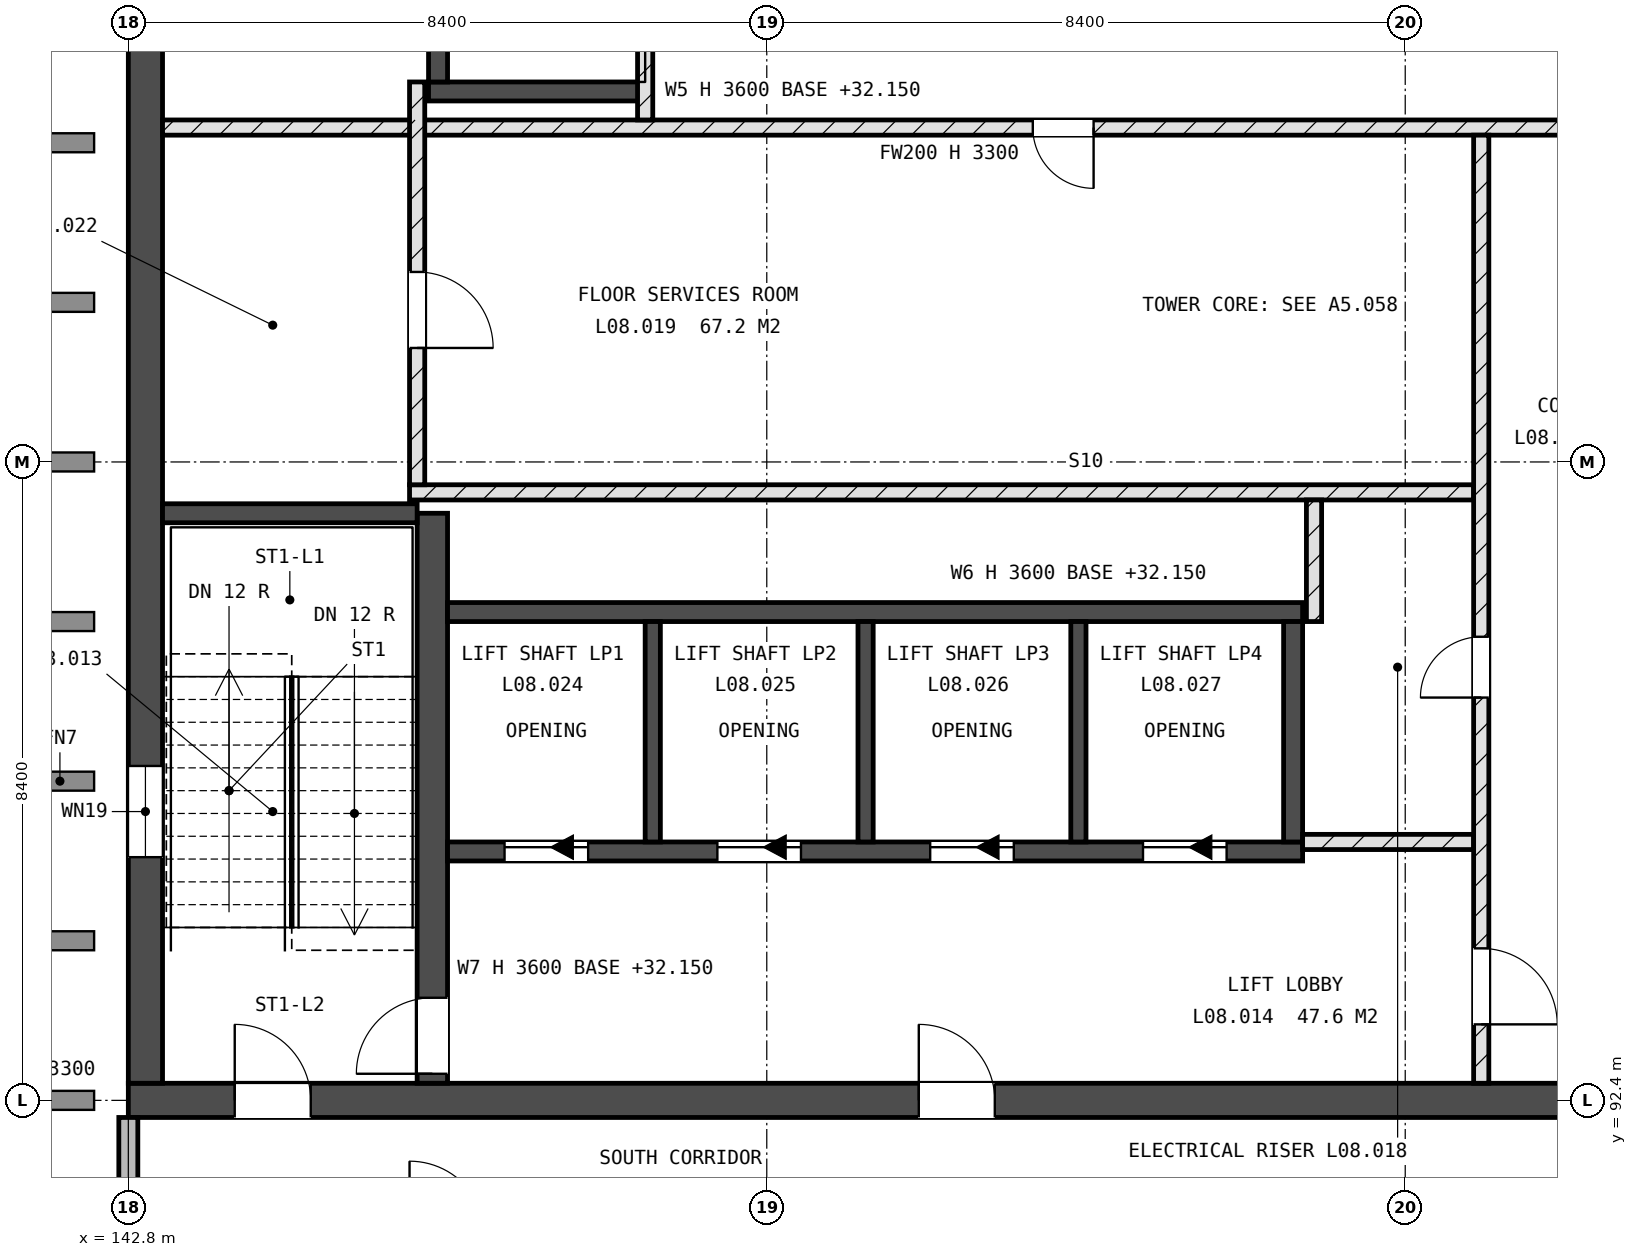
"""IFC4 building model, lengths in metres.
Left out: names, types, materials, properties, quantities, classifications, styles, units other than length and angle.
Written with IfcOpenShell. Run it as: python <this file> out.ifc"""

import sys

from ifc_helpers import new_model, si_unit, direction, frame, frame_2d, origin, place, context, subcontext, project, spatial, rectangle, extrude, element, fill, save


model = new_model("IFC4")
c1 = context("Model", 3, precision=1e-05, world=origin(), true_north=direction((0.0, 1.0)))
c2 = subcontext(c1, "Body", "Model", "MODEL_VIEW")
j1 = project(units=[si_unit("LENGTHUNIT", "METRE"), si_unit("PLANEANGLEUNIT", "RADIAN")], contexts=[c1])
p1 = place(None, origin())
s1 = spatial("IfcSite", under=j1, at=p1, CompositionType="ELEMENT")
p2 = place(p1, origin())
s2 = spatial("IfcBuilding", under=s1, at=p2, CompositionType="ELEMENT")
p3 = place(p2, frame((0.0, 0.0, 32.4)))
s3 = spatial("IfcBuildingStorey", under=s2, at=p3, CompositionType="ELEMENT", Elevation=32.4)
p4 = place(p3, frame((142.8, 92.4, -0.25), z_axis=(0.0, 0.0, 1.0), x_axis=(1.0, 0.0, 0.0)))
e1 = element("IfcWall", 1, at=p4, inside=s3, PredefinedType="SHEAR", context=c2, shape_type="SweptSolid", body=[
    extrude(rectangle(XDim=25.2, YDim=0.45, at=frame_2d((12.6, 0.0))), origin(), (0.0, 0.0, 1.0), 3.6),
])
p5 = place(p4, frame((1.4, 0.0, 0.25)))
e2 = element("IfcOpeningElement", 2, at=p5, cuts=e1, PredefinedType="OPENING", context=c2, shape_type="SweptSolid", body=[
    extrude(rectangle(XDim=1.0, YDim=2.1, at=frame_2d((0.5, 1.05))), frame((0.0, 0.235, 0.0), z_axis=(0.0, -1.0, 0.0), x_axis=(1.0, 0.0, 0.0)), (0.0, 0.0, 1.0), 0.47),
])
p6 = place(p4, frame((19.1, 0.0, 0.25)))
e3 = element("IfcOpeningElement", 3, at=p6, cuts=e1, PredefinedType="OPENING", context=c2, shape_type="SweptSolid", body=[
    extrude(rectangle(XDim=1.0, YDim=2.1, at=frame_2d((0.5, 1.05))), frame((0.0, 0.235, 0.0), z_axis=(0.0, -1.0, 0.0), x_axis=(1.0, 0.0, 0.0)), (0.0, 0.0, 1.0), 0.47),
])
p7 = place(p4, frame((10.4, 0.0, 0.25)))
e4 = element("IfcOpeningElement", 4, at=p7, cuts=e1, PredefinedType="OPENING", context=c2, shape_type="SweptSolid", body=[
    extrude(rectangle(XDim=1.0, YDim=2.1, at=frame_2d((0.5, 1.05))), frame((0.0, 0.235, 0.0), z_axis=(0.0, -1.0, 0.0), x_axis=(1.0, 0.0, 0.0)), (0.0, 0.0, 1.0), 0.47),
])
p8 = place(p3, frame((143.025, 92.625, -0.25), z_axis=(0.0, 0.0, 1.0), x_axis=(0.0, 1.0, 0.0)))
e5 = element("IfcWall", 5, at=p8, inside=s3, PredefinedType="SHEAR", context=c2, shape_type="SweptSolid", body=[
    extrude(rectangle(XDim=16.35, YDim=0.45, at=frame_2d((8.175, 0.0))), origin(), (0.0, 0.0, 1.0), 3.6),
])
p9 = place(p8, frame((2.975, 0.0, 1.85)))
e6 = element("IfcOpeningElement", 6, at=p9, cuts=e5, PredefinedType="OPENING", context=c2, shape_type="SweptSolid", body=[
    extrude(rectangle(XDim=1.2, YDim=0.9, at=frame_2d((0.6, 0.45))), frame((0.0, 0.235, 0.0), z_axis=(0.0, -1.0, 0.0), x_axis=(1.0, 0.0, 0.0)), (0.0, 0.0, 1.0), 0.47),
])
p10 = place(p3, frame((146.8, 92.625, -0.25), z_axis=(0.0, 0.0, 1.0), x_axis=(0.0, 1.0, 0.0)))
e7 = element("IfcWall", 7, at=p10, inside=s3, PredefinedType="SHEAR", context=c2, shape_type="SweptSolid", body=[
    extrude(rectangle(XDim=7.5, YDim=0.4, at=frame_2d((3.75, 0.0))), origin(), (0.0, 0.0, 1.0), 3.6),
])
p11 = place(p10, frame((0.125, 0.0, 0.25)))
e8 = element("IfcOpeningElement", 8, at=p11, cuts=e7, PredefinedType="OPENING", context=c2, shape_type="SweptSolid", body=[
    extrude(rectangle(XDim=1.0, YDim=2.1, at=frame_2d((0.5, 1.05))), frame((0.0, 0.21, 0.0), z_axis=(0.0, -1.0, 0.0), x_axis=(1.0, 0.0, 0.0)), (0.0, 0.0, 1.0), 0.42),
])
p12 = place(p3, frame((143.25, 100.125, -0.25), z_axis=(0.0, 0.0, 1.0), x_axis=(1.0, 0.0, 0.0)))
e9 = element("IfcWall", 9, at=p12, inside=s3, PredefinedType="SHEAR", context=c2, shape_type="SweptSolid", body=[
    extrude(rectangle(XDim=3.35, YDim=0.25, at=frame_2d((1.675, 0.0))), origin(), (0.0, 0.0, 1.0), 3.6),
])
p13 = place(p3, frame((147.0, 95.675, -0.25), z_axis=(0.0, 0.0, 1.0), x_axis=(1.0, 0.0, 0.0)))
e10 = element("IfcWall", 10, at=p13, inside=s3, PredefinedType="SHEAR", context=c2, shape_type="SweptSolid", body=[
    extrude(rectangle(XDim=11.25, YDim=0.25, at=frame_2d((5.625, 0.0))), origin(), (0.0, 0.0, 1.0), 3.6),
])
p14 = place(p13, frame((0.75, 0.0, 0.25)))
e11 = element("IfcOpeningElement", 11, at=p14, cuts=e10, PredefinedType="OPENING", context=c2, shape_type="SweptSolid", body=[
    extrude(rectangle(XDim=1.1, YDim=2.1, at=frame_2d((0.55, 1.05))), frame((0.0, 0.135, 0.0), z_axis=(0.0, -1.0, 0.0), x_axis=(1.0, 0.0, 0.0)), (0.0, 0.0, 1.0), 0.27),
])
p15 = place(p13, frame((3.55, 0.0, 0.25)))
e12 = element("IfcOpeningElement", 12, at=p15, cuts=e10, PredefinedType="OPENING", context=c2, shape_type="SweptSolid", body=[
    extrude(rectangle(XDim=1.1, YDim=2.1, at=frame_2d((0.55, 1.05))), frame((0.0, 0.135, 0.0), z_axis=(0.0, -1.0, 0.0), x_axis=(1.0, 0.0, 0.0)), (0.0, 0.0, 1.0), 0.27),
])
p16 = place(p13, frame((6.35, 0.0, 0.25)))
e13 = element("IfcOpeningElement", 13, at=p16, cuts=e10, PredefinedType="OPENING", context=c2, shape_type="SweptSolid", body=[
    extrude(rectangle(XDim=1.1, YDim=2.1, at=frame_2d((0.55, 1.05))), frame((0.0, 0.135, 0.0), z_axis=(0.0, -1.0, 0.0), x_axis=(1.0, 0.0, 0.0)), (0.0, 0.0, 1.0), 0.27),
])
p17 = place(p13, frame((9.15, 0.0, 0.25)))
e14 = element("IfcOpeningElement", 14, at=p17, cuts=e10, PredefinedType="OPENING", context=c2, shape_type="SweptSolid", body=[
    extrude(rectangle(XDim=1.1, YDim=2.1, at=frame_2d((0.55, 1.05))), frame((0.0, 0.135, 0.0), z_axis=(0.0, -1.0, 0.0), x_axis=(1.0, 0.0, 0.0)), (0.0, 0.0, 1.0), 0.27),
])
p18 = place(p3, frame((147.0, 98.825, -0.25), z_axis=(0.0, 0.0, 1.0), x_axis=(1.0, 0.0, 0.0)))
e15 = element("IfcWall", 15, at=p18, inside=s3, PredefinedType="SHEAR", context=c2, shape_type="SweptSolid", body=[
    extrude(rectangle(XDim=11.25, YDim=0.25, at=frame_2d((5.625, 0.0))), origin(), (0.0, 0.0, 1.0), 3.6),
])
p19 = place(p3, frame((158.125, 95.8, -0.25), z_axis=(0.0, 0.0, 1.0), x_axis=(0.0, 1.0, 0.0)))
e16 = element("IfcWall", 16, at=p19, inside=s3, PredefinedType="SHEAR", context=c2, shape_type="SweptSolid", body=[
    extrude(rectangle(XDim=2.9, YDim=0.25, at=frame_2d((1.45, 0.0))), origin(), (0.0, 0.0, 1.0), 3.6),
])
for number, where, z_axis, x_axis in (
    (17, (149.7, 95.8, -0.25), (0.0, 0.0, 1.0), (0.0, 1.0, 0.0)),
    (18, (152.5, 95.8, -0.25), (0.0, 0.0, 1.0), (0.0, 1.0, 0.0)),
    (19, (155.3, 95.8, -0.25), (0.0, 0.0, 1.0), (0.0, 1.0, 0.0)),
):
    element("IfcWall", number, at=place(p3, frame(where, z_axis=z_axis, x_axis=x_axis)), inside=s3, PredefinedType="SHEAR", context=c2, shape_type="SweptSolid", body=[
        extrude(rectangle(XDim=2.9, YDim=0.2, at=frame_2d((1.45, 0.0))), origin(), (0.0, 0.0, 1.0), 3.6),
    ])
p20 = place(p3, frame((146.75, 105.675, -0.25), z_axis=(0.0, 0.0, 1.0), x_axis=(1.0, 0.0, 0.0)))
e20 = element("IfcWall", 20, at=p20, inside=s3, PredefinedType="SHEAR", context=c2, shape_type="SweptSolid", body=[
    extrude(rectangle(XDim=2.85, YDim=0.25, at=frame_2d((1.425, 0.0))), origin(), (0.0, 0.0, 1.0), 3.6),
])
p21 = place(p3, frame((146.875, 105.8, -0.25), z_axis=(0.0, 0.0, 1.0), x_axis=(0.0, 1.0, 0.0)))
e21 = element("IfcWall", 21, at=p21, inside=s3, PredefinedType="SHEAR", context=c2, shape_type="SweptSolid", body=[
    extrude(rectangle(XDim=2.9, YDim=0.25, at=frame_2d((1.45, 0.0))), origin(), (0.0, 0.0, 1.0), 3.6),
])
p22 = place(p3, frame((142.8, 84.45, 0.0), z_axis=(0.0, 0.0, 1.0), x_axis=(0.0, 1.0, 0.0)))
e22 = element("IfcWall", 22, at=p22, inside=s3, PredefinedType="STANDARD", context=c2, shape_type="SweptSolid", body=[
    extrude(rectangle(XDim=7.725, YDim=0.25, at=frame_2d((3.863, 0.0))), origin(), (0.0, 0.0, 1.0), 3.3),
])
p23 = place(p22, frame((2.25, 0.0, 2.1)))
e23 = element("IfcOpeningElement", 23, at=p23, cuts=e22, PredefinedType="OPENING", context=c2, shape_type="SweptSolid", body=[
    extrude(rectangle(XDim=0.9, YDim=0.6, at=frame_2d((0.45, 0.3))), frame((0.0, 0.135, 0.0), z_axis=(0.0, -1.0, 0.0), x_axis=(1.0, 0.0, 0.0)), (0.0, 0.0, 1.0), 0.27),
])
p24 = place(p3, frame((158.25, 95.8, 0.0), z_axis=(0.0, 0.0, 1.0), x_axis=(1.0, 0.0, 0.0)))
e24 = element("IfcWall", 24, at=p24, inside=s3, PredefinedType="SOLIDWALL", context=c2, shape_type="SweptSolid", body=[
    extrude(rectangle(XDim=2.25, YDim=0.2, at=frame_2d((1.125, 0.0))), origin(), (0.0, 0.0, 1.0), 3.3),
])
p25 = place(p3, frame((146.5, 100.4, 0.0), z_axis=(0.0, 0.0, 1.0), x_axis=(1.0, 0.0, 0.0)))
e25 = element("IfcWall", 25, at=p25, inside=s3, PredefinedType="SOLIDWALL", context=c2, shape_type="SweptSolid", body=[
    extrude(rectangle(XDim=14.0, YDim=0.2, at=frame_2d((7.0, 0.0))), origin(), (0.0, 0.0, 1.0), 3.3),
])
p26 = place(p3, frame((143.25, 105.2, 0.0), z_axis=(0.0, 0.0, 1.0), x_axis=(1.0, 0.0, 0.0)))
e26 = element("IfcWall", 26, at=p26, inside=s3, PredefinedType="SOLIDWALL", context=c2, shape_type="SweptSolid", body=[
    extrude(rectangle(XDim=20.7, YDim=0.2, at=frame_2d((10.35, 0.0))), origin(), (0.0, 0.0, 1.0), 3.3),
])
p27 = place(p26, frame((11.45, 0.0, 0.0)))
e27 = element("IfcOpeningElement", 27, at=p27, cuts=e26, PredefinedType="OPENING", context=c2, shape_type="SweptSolid", body=[
    extrude(rectangle(XDim=0.8, YDim=2.1, at=frame_2d((0.4, 1.05))), frame((0.0, 0.11, 0.0), z_axis=(0.0, -1.0, 0.0), x_axis=(1.0, 0.0, 0.0)), (0.0, 0.0, 1.0), 0.22),
])
p28 = place(p26, frame((18.75, 0.0, 0.0)))
e28 = element("IfcOpeningElement", 28, at=p28, cuts=e26, PredefinedType="OPENING", context=c2, shape_type="SweptSolid", body=[
    extrude(rectangle(XDim=1.0, YDim=2.1, at=frame_2d((0.5, 1.05))), frame((0.0, 0.11, 0.0), z_axis=(0.0, -1.0, 0.0), x_axis=(1.0, 0.0, 0.0)), (0.0, 0.0, 1.0), 0.22),
])
p29 = place(p3, frame((146.6, 100.5, 0.0), z_axis=(0.0, 0.0, 1.0), x_axis=(0.0, 1.0, 0.0)))
e29 = element("IfcWall", 29, at=p29, inside=s3, PredefinedType="SOLIDWALL", context=c2, shape_type="SweptSolid", body=[
    extrude(rectangle(XDim=5.3, YDim=0.2, at=frame_2d((2.65, 0.0))), origin(), (0.0, 0.0, 1.0), 3.3),
])
p30 = place(p29, frame((1.8, 0.0, 0.0)))
e30 = element("IfcOpeningElement", 30, at=p30, cuts=e29, PredefinedType="OPENING", context=c2, shape_type="SweptSolid", body=[
    extrude(rectangle(XDim=1.0, YDim=2.1, at=frame_2d((0.5, 1.05))), frame((0.0, 0.11, 0.0), z_axis=(0.0, -1.0, 0.0), x_axis=(1.0, 0.0, 0.0)), (0.0, 0.0, 1.0), 0.22),
])
p31 = place(p3, frame((149.6, 105.3, 0.0), z_axis=(0.0, 0.0, 1.0), x_axis=(0.0, 1.0, 0.0)))
e31 = element("IfcWall", 31, at=p31, inside=s3, PredefinedType="SOLIDWALL", context=c2, shape_type="SweptSolid", body=[
    extrude(rectangle(XDim=3.675, YDim=0.2, at=frame_2d((1.837, 0.0))), origin(), (0.0, 0.0, 1.0), 3.3),
])
p32 = place(p31, frame((1.4, 0.0, 0.0)))
e32 = element("IfcOpeningElement", 32, at=p32, cuts=e31, PredefinedType="OPENING", context=c2, shape_type="SweptSolid", body=[
    extrude(rectangle(XDim=1.1, YDim=2.1, at=frame_2d((0.55, 1.05))), frame((0.0, 0.11, 0.0), z_axis=(0.0, -1.0, 0.0), x_axis=(1.0, 0.0, 0.0)), (0.0, 0.0, 1.0), 0.22),
])
p33 = place(p3, frame((158.4, 98.7, 0.0), z_axis=(0.0, 0.0, 1.0), x_axis=(0.0, 1.0, 0.0)))
e33 = element("IfcWall", 33, at=p33, inside=s3, PredefinedType="SOLIDWALL", context=c2, shape_type="SweptSolid", body=[
    extrude(rectangle(XDim=1.6, YDim=0.2, at=frame_2d((0.8, 0.0))), origin(), (0.0, 0.0, 1.0), 3.3),
])
p34 = place(p3, frame((160.6, 92.625, 0.0), z_axis=(0.0, 0.0, 1.0), x_axis=(0.0, 1.0, 0.0)))
e34 = element("IfcWall", 34, at=p34, inside=s3, PredefinedType="SOLIDWALL", context=c2, shape_type="SweptSolid", body=[
    extrude(rectangle(XDim=12.475, YDim=0.2, at=frame_2d((6.238, 0.0))), origin(), (0.0, 0.0, 1.0), 3.3),
])
p35 = place(p34, frame((5.075, 0.0, 0.0)))
e35 = element("IfcOpeningElement", 35, at=p35, cuts=e34, PredefinedType="OPENING", context=c2, shape_type="SweptSolid", body=[
    extrude(rectangle(XDim=0.8, YDim=2.1, at=frame_2d((0.4, 1.05))), frame((0.0, 0.11, 0.0), z_axis=(0.0, -1.0, 0.0), x_axis=(1.0, 0.0, 0.0)), (0.0, 0.0, 1.0), 0.22),
])
p36 = place(p34, frame((0.775, 0.0, 0.0)))
e36 = element("IfcOpeningElement", 36, at=p36, cuts=e34, PredefinedType="OPENING", context=c2, shape_type="SweptSolid", body=[
    extrude(rectangle(XDim=1.0, YDim=2.1, at=frame_2d((0.5, 1.05))), frame((0.0, 0.11, 0.0), z_axis=(0.0, -1.0, 0.0), x_axis=(1.0, 0.0, 0.0)), (0.0, 0.0, 1.0), 0.22),
])
p37 = place(p9, origin())
e37 = element("IfcWindow", 37, at=p37, inside=s3, PartitioningType="SINGLE_PANEL", PredefinedType="WINDOW", context=c2, shape_type="SweptSolid", body=[
    extrude(rectangle(XDim=1.2, YDim=0.9, at=frame_2d((0.6, 0.45))), frame((0.0, 0.03, 0.0), z_axis=(0.0, -1.0, 0.0), x_axis=(1.0, 0.0, 0.0)), (0.0, 0.0, 1.0), 0.06),
])
fill(e6, e37)
p38 = place(p14, origin())
e38 = element("IfcDoor", 38, at=p38, inside=s3, OperationType="SLIDING_TO_LEFT", PredefinedType="DOOR", context=c2, shape_type="SweptSolid", body=[
    extrude(rectangle(XDim=1.1, YDim=2.1, at=frame_2d((0.55, 1.05))), frame((0.0, 0.025, 0.0), z_axis=(0.0, -1.0, 0.0), x_axis=(1.0, 0.0, 0.0)), (0.0, 0.0, 1.0), 0.05),
])
fill(e11, e38)
p39 = place(p15, origin())
e39 = element("IfcDoor", 39, at=p39, inside=s3, OperationType="SLIDING_TO_LEFT", PredefinedType="DOOR", context=c2, shape_type="SweptSolid", body=[
    extrude(rectangle(XDim=1.1, YDim=2.1, at=frame_2d((0.55, 1.05))), frame((0.0, 0.025, 0.0), z_axis=(0.0, -1.0, 0.0), x_axis=(1.0, 0.0, 0.0)), (0.0, 0.0, 1.0), 0.05),
])
fill(e12, e39)
p40 = place(p16, origin())
e40 = element("IfcDoor", 40, at=p40, inside=s3, OperationType="SLIDING_TO_LEFT", PredefinedType="DOOR", context=c2, shape_type="SweptSolid", body=[
    extrude(rectangle(XDim=1.1, YDim=2.1, at=frame_2d((0.55, 1.05))), frame((0.0, 0.025, 0.0), z_axis=(0.0, -1.0, 0.0), x_axis=(1.0, 0.0, 0.0)), (0.0, 0.0, 1.0), 0.05),
])
fill(e13, e40)
p41 = place(p17, origin())
e41 = element("IfcDoor", 41, at=p41, inside=s3, OperationType="SLIDING_TO_LEFT", PredefinedType="DOOR", context=c2, shape_type="SweptSolid", body=[
    extrude(rectangle(XDim=1.1, YDim=2.1, at=frame_2d((0.55, 1.05))), frame((0.0, 0.025, 0.0), z_axis=(0.0, -1.0, 0.0), x_axis=(1.0, 0.0, 0.0)), (0.0, 0.0, 1.0), 0.05),
])
fill(e14, e41)
p42 = place(p5, origin())
e42 = element("IfcDoor", 42, at=p42, inside=s3, OperationType="SINGLE_SWING_RIGHT", PredefinedType="DOOR", context=c2, shape_type="SweptSolid", body=[
    extrude(rectangle(XDim=1.0, YDim=2.1, at=frame_2d((0.5, 1.05))), frame((0.0, 0.025, 0.0), z_axis=(0.0, -1.0, 0.0), x_axis=(1.0, 0.0, 0.0)), (0.0, 0.0, 1.0), 0.05),
])
fill(e2, e42)
p43 = place(p11, origin())
e43 = element("IfcDoor", 43, at=p43, inside=s3, OperationType="SINGLE_SWING_RIGHT", PredefinedType="DOOR", context=c2, shape_type="SweptSolid", body=[
    extrude(rectangle(XDim=1.0, YDim=2.1, at=frame_2d((0.5, 1.05))), frame((0.0, 0.025, 0.0), z_axis=(0.0, -1.0, 0.0), x_axis=(1.0, 0.0, 0.0)), (0.0, 0.0, 1.0), 0.05),
])
fill(e8, e43)
p44 = place(p35, origin())
e44 = element("IfcDoor", 44, at=p44, inside=s3, OperationType="SINGLE_SWING_RIGHT", PredefinedType="DOOR", context=c2, shape_type="SweptSolid", body=[
    extrude(rectangle(XDim=0.8, YDim=2.1, at=frame_2d((0.4, 1.05))), frame((0.0, 0.025, 0.0), z_axis=(0.0, -1.0, 0.0), x_axis=(1.0, 0.0, 0.0)), (0.0, 0.0, 1.0), 0.05),
])
fill(e35, e44)
p45 = place(p27, origin())
e45 = element("IfcDoor", 45, at=p45, inside=s3, OperationType="SINGLE_SWING_RIGHT", PredefinedType="DOOR", context=c2, shape_type="SweptSolid", body=[
    extrude(rectangle(XDim=0.8, YDim=2.1, at=frame_2d((0.4, 1.05))), frame((0.0, 0.025, 0.0), z_axis=(0.0, -1.0, 0.0), x_axis=(1.0, 0.0, 0.0)), (0.0, 0.0, 1.0), 0.05),
])
fill(e27, e45)
p46 = place(p30, origin())
e46 = element("IfcDoor", 46, at=p46, inside=s3, OperationType="SINGLE_SWING_LEFT", PredefinedType="DOOR", context=c2, shape_type="SweptSolid", body=[
    extrude(rectangle(XDim=1.0, YDim=2.1, at=frame_2d((0.5, 1.05))), frame((0.0, 0.025, 0.0), z_axis=(0.0, -1.0, 0.0), x_axis=(1.0, 0.0, 0.0)), (0.0, 0.0, 1.0), 0.05),
])
fill(e30, e46)
p47 = place(p7, origin())
e47 = element("IfcDoor", 47, at=p47, inside=s3, OperationType="SINGLE_SWING_RIGHT", PredefinedType="DOOR", context=c2, shape_type="SweptSolid", body=[
    extrude(rectangle(XDim=1.0, YDim=2.1, at=frame_2d((0.5, 1.05))), frame((0.0, 0.025, 0.0), z_axis=(0.0, -1.0, 0.0), x_axis=(1.0, 0.0, 0.0)), (0.0, 0.0, 1.0), 0.05),
])
fill(e4, e47)
p48 = place(p36, origin())
e48 = element("IfcDoor", 48, at=p48, inside=s3, OperationType="SINGLE_SWING_LEFT", PredefinedType="DOOR", context=c2, shape_type="SweptSolid", body=[
    extrude(rectangle(XDim=1.0, YDim=2.1, at=frame_2d((0.5, 1.05))), frame((0.0, 0.025, 0.0), z_axis=(0.0, -1.0, 0.0), x_axis=(1.0, 0.0, 0.0)), (0.0, 0.0, 1.0), 0.05),
])
fill(e36, e48)
save(model, sys.argv[1])
